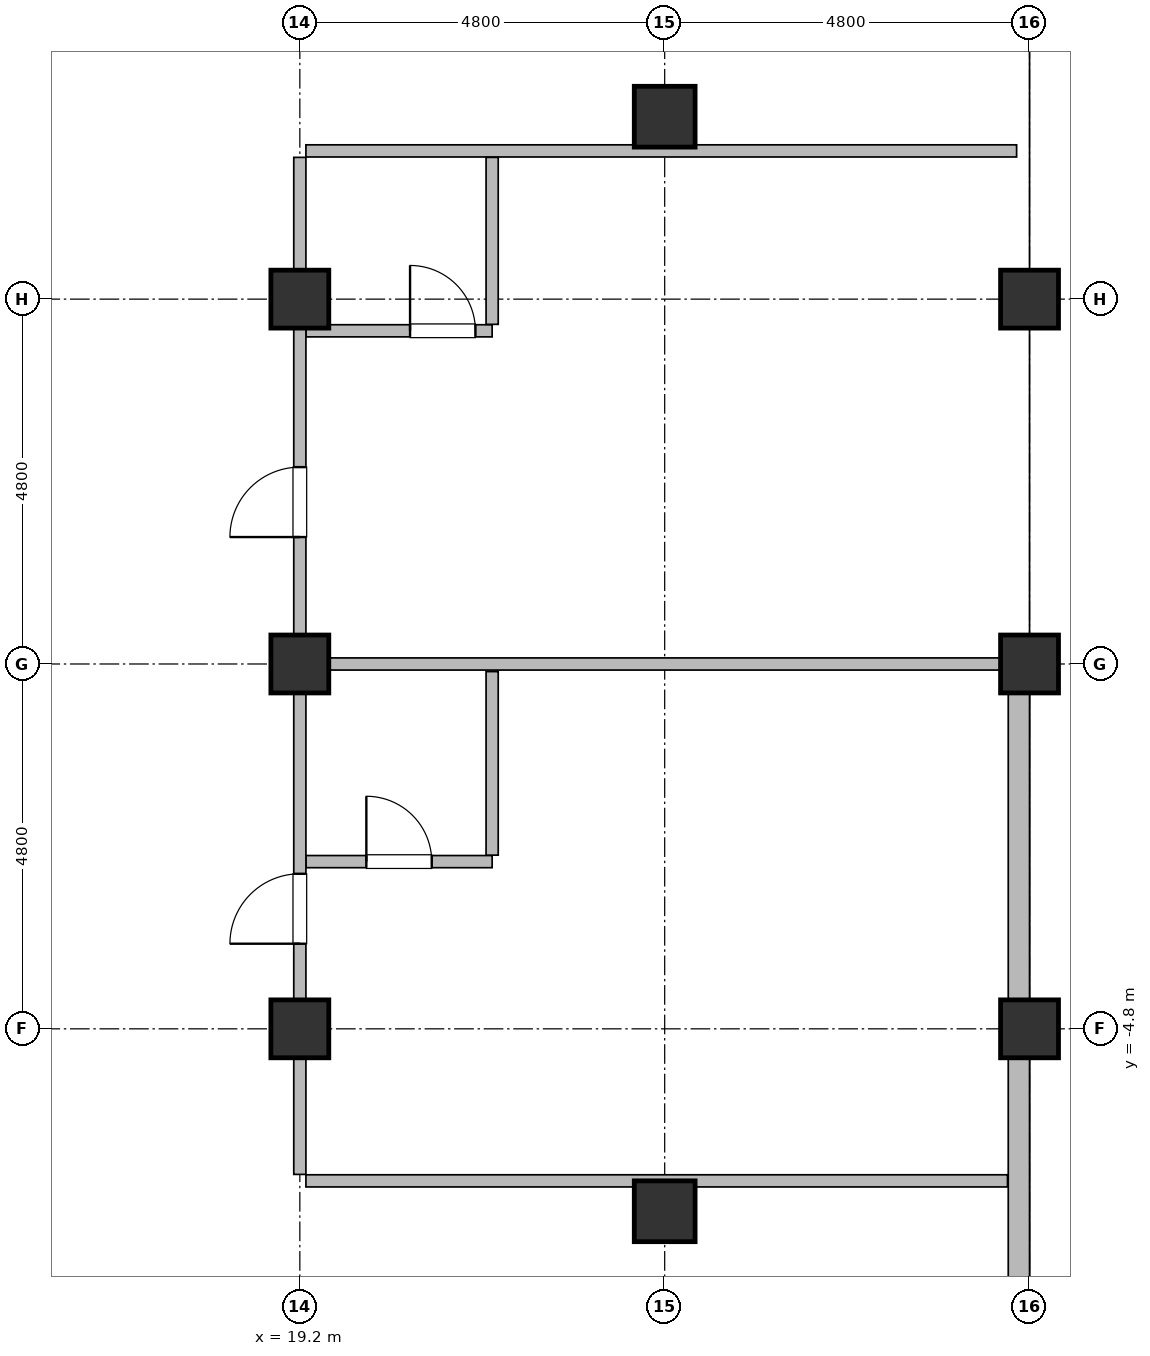
"""IFC4 building model, lengths in metres.
Left out: names, types, materials, properties, quantities, classifications, styles, units other than length and angle.
Written with IfcOpenShell. Run it as: python <this file> out.ifc"""

import sys

from ifc_helpers import new_model, si_unit, direction, frame, frame_2d, origin, origin_2d, place, context, subcontext, project, spatial, rectangle, hollow_rectangle, hollow_circle, extrude, element, fill, save


model = new_model("IFC4")
c1 = context("Model", 3, precision=1e-05, world=origin(), true_north=direction((0.0, 1.0)))
c2 = subcontext(c1, "Body", "Model", "MODEL_VIEW")
j1 = project(units=[si_unit("LENGTHUNIT", "METRE"), si_unit("PLANEANGLEUNIT", "RADIAN")], contexts=[c1])
p1 = place(None, origin())
s1 = spatial("IfcSite", under=j1, at=p1, CompositionType="ELEMENT")
p2 = place(p1, origin())
s2 = spatial("IfcBuilding", under=s1, at=p2, CompositionType="ELEMENT")
p3 = place(p2, frame((0.0, 0.0, 48.5)))
s3 = spatial("IfcBuildingStorey", under=s2, at=p3, CompositionType="ELEMENT", Elevation=48.5)
for number, where, z_axis, x_axis in (
    (1, (19.2, -4.8, 0.0), (0.0, 0.0, 1.0), (1.0, 0.0, 0.0)),
    (2, (19.2, 0.0, 0.0), (0.0, 0.0, 1.0), (1.0, 0.0, 0.0)),
    (3, (19.2, 4.8, 0.0), (0.0, 0.0, 1.0), (1.0, 0.0, 0.0)),
):
    element("IfcColumn", number, at=place(p3, frame(where, z_axis=z_axis, x_axis=x_axis)), inside=s3, PredefinedType="COLUMN", context=c2, shape_type="SweptSolid", body=[
        extrude(hollow_circle(Radius=0.381, WallThickness=0.032, at=origin_2d()), origin(), (0.0, 0.0, 1.0), 3.7),
    ])
for number, where, z_axis, x_axis in (
    (4, (24.0, -7.2, 0.0), (0.0, 0.0, 1.0), (1.0, 0.0, 0.0)),
    (5, (24.0, 7.2, 0.0), (0.0, 0.0, 1.0), (1.0, 0.0, 0.0)),
):
    element("IfcColumn", number, at=place(p3, frame(where, z_axis=z_axis, x_axis=x_axis)), inside=s3, PredefinedType="COLUMN", context=c2, shape_type="SweptSolid", body=[
        extrude(hollow_rectangle(XDim=0.8, YDim=0.8, WallThickness=0.036, at=origin_2d()), origin(), (0.0, 0.0, 1.0), 3.7),
    ])
for number, where, z_axis, x_axis in (
    (6, (28.8, -4.8, 0.0), (0.0, 0.0, 1.0), (1.0, 0.0, 0.0)),
    (7, (28.8, 0.0, 0.0), (0.0, 0.0, 1.0), (1.0, 0.0, 0.0)),
    (8, (28.8, 4.8, 0.0), (0.0, 0.0, 1.0), (1.0, 0.0, 0.0)),
):
    element("IfcColumn", number, at=place(p3, frame(where, z_axis=z_axis, x_axis=x_axis)), inside=s3, PredefinedType="COLUMN", context=c2, shape_type="SweptSolid", body=[
        extrude(hollow_circle(Radius=0.381, WallThickness=0.032, at=origin_2d()), origin(), (0.0, 0.0, 1.0), 3.7),
    ])
p4 = place(p3, frame((28.66, -20.4, 0.0), z_axis=(0.0, 0.0, 1.0), x_axis=(0.0, 1.0, 0.0)))
e9 = element("IfcWall", 9, at=p4, inside=s3, PredefinedType="SOLIDWALL", context=c2, shape_type="SweptSolid", body=[
    extrude(rectangle(XDim=20.38, YDim=0.28, at=frame_2d((10.19, 0.0))), origin(), (0.0, 0.0, 1.0), 2.12),
])
p5 = place(p4, frame((17.25, 0.0, 0.75)))
e10 = element("IfcOpeningElement", 10, at=p5, cuts=e9, PredefinedType="OPENING", context=c2, shape_type="SweptSolid", body=[
    extrude(rectangle(XDim=1.5, YDim=1.15, at=frame_2d((0.75, 0.575))), frame((0.0, 0.155, 0.0), z_axis=(0.0, -1.0, 0.0), x_axis=(1.0, 0.0, 0.0)), (0.0, 0.0, 1.0), 0.31),
])
p6 = place(p3, frame((19.28, -6.8, 0.0), z_axis=(0.0, 0.0, 1.0), x_axis=(1.0, 0.0, 0.0)))
e11 = element("IfcWall", 11, at=p6, inside=s3, PredefinedType="PARTITIONING", context=c2, shape_type="SweptSolid", body=[
    extrude(rectangle(XDim=9.23, YDim=0.16, at=frame_2d((4.615, 0.0))), origin(), (0.0, 0.0, 1.0), 2.62),
])
p7 = place(p3, frame((19.28, -2.6, 0.0), z_axis=(0.0, 0.0, 1.0), x_axis=(1.0, 0.0, 0.0)))
e12 = element("IfcWall", 12, at=p7, inside=s3, PredefinedType="PARTITIONING", context=c2, shape_type="SweptSolid", body=[
    extrude(rectangle(XDim=2.45, YDim=0.16, at=frame_2d((1.225, 0.0))), origin(), (0.0, 0.0, 1.0), 2.82),
])
p8 = place(p7, frame((0.795, 0.0, 0.0)))
e13 = element("IfcOpeningElement", 13, at=p8, cuts=e12, PredefinedType="OPENING", context=c2, shape_type="SweptSolid", body=[
    extrude(rectangle(XDim=0.86, YDim=2.1, at=frame_2d((0.43, 1.05))), frame((0.0, 0.095, 0.0), z_axis=(0.0, -1.0, 0.0), x_axis=(1.0, 0.0, 0.0)), (0.0, 0.0, 1.0), 0.19),
])
p9 = place(p3, frame((19.28, 0.0, 0.0), z_axis=(0.0, 0.0, 1.0), x_axis=(1.0, 0.0, 0.0)))
e14 = element("IfcWall", 14, at=p9, inside=s3, PredefinedType="PARTITIONING", context=c2, shape_type="SweptSolid", body=[
    extrude(rectangle(XDim=9.35, YDim=0.16, at=frame_2d((4.675, 0.0))), origin(), (0.0, 0.0, 1.0), 2.82),
])
p10 = place(p3, frame((19.28, 4.383, 0.0), z_axis=(0.0, 0.0, 1.0), x_axis=(1.0, 0.0, 0.0)))
e15 = element("IfcWall", 15, at=p10, inside=s3, PredefinedType="PARTITIONING", context=c2, shape_type="SweptSolid", body=[
    extrude(rectangle(XDim=2.45, YDim=0.16, at=frame_2d((1.225, 0.0))), origin(), (0.0, 0.0, 1.0), 2.82),
])
p11 = place(p10, frame((1.37, 0.0, 0.0)))
e16 = element("IfcOpeningElement", 16, at=p11, cuts=e15, PredefinedType="OPENING", context=c2, shape_type="SweptSolid", body=[
    extrude(rectangle(XDim=0.86, YDim=2.1, at=frame_2d((0.43, 1.05))), frame((0.0, 0.095, 0.0), z_axis=(0.0, -1.0, 0.0), x_axis=(1.0, 0.0, 0.0)), (0.0, 0.0, 1.0), 0.19),
])
p12 = place(p3, frame((19.28, 6.75, 0.0), z_axis=(0.0, 0.0, 1.0), x_axis=(1.0, 0.0, 0.0)))
e17 = element("IfcWall", 17, at=p12, inside=s3, PredefinedType="PARTITIONING", context=c2, shape_type="SweptSolid", body=[
    extrude(rectangle(XDim=9.35, YDim=0.16, at=frame_2d((4.675, 0.0))), origin(), (0.0, 0.0, 1.0), 2.62),
])
p13 = place(p3, frame((19.2, -6.715, 0.0), z_axis=(0.0, 0.0, 1.0), x_axis=(0.0, 1.0, 0.0)))
e18 = element("IfcWall", 18, at=p13, inside=s3, PredefinedType="PARTITIONING", context=c2, shape_type="SweptSolid", body=[
    extrude(rectangle(XDim=13.38, YDim=0.16, at=frame_2d((6.69, 0.0))), origin(), (0.0, 0.0, 1.0), 2.62),
])
p14 = place(p13, frame((3.035, 0.0, 0.0)))
e19 = element("IfcOpeningElement", 19, at=p14, cuts=e18, PredefinedType="OPENING", context=c2, shape_type="SweptSolid", body=[
    extrude(rectangle(XDim=0.92, YDim=2.15, at=frame_2d((0.46, 1.075))), frame((0.0, 0.095, 0.0), z_axis=(0.0, -1.0, 0.0), x_axis=(1.0, 0.0, 0.0)), (0.0, 0.0, 1.0), 0.19),
])
p15 = place(p13, frame((8.385, 0.0, 0.0)))
e20 = element("IfcOpeningElement", 20, at=p15, cuts=e18, PredefinedType="OPENING", context=c2, shape_type="SweptSolid", body=[
    extrude(rectangle(XDim=0.92, YDim=2.15, at=frame_2d((0.46, 1.075))), frame((0.0, 0.095, 0.0), z_axis=(0.0, -1.0, 0.0), x_axis=(1.0, 0.0, 0.0)), (0.0, 0.0, 1.0), 0.19),
])
p16 = place(p3, frame((21.73, -2.515, 0.0), z_axis=(0.0, 0.0, 1.0), x_axis=(0.0, 1.0, 0.0)))
e21 = element("IfcWall", 21, at=p16, inside=s3, PredefinedType="PARTITIONING", context=c2, shape_type="SweptSolid", body=[
    extrude(rectangle(XDim=2.415, YDim=0.16, at=frame_2d((1.208, 0.0))), origin(), (0.0, 0.0, 1.0), 3.52),
])
p17 = place(p3, frame((21.73, 4.468, 0.0), z_axis=(0.0, 0.0, 1.0), x_axis=(0.0, 1.0, 0.0)))
e22 = element("IfcWall", 22, at=p17, inside=s3, PredefinedType="PARTITIONING", context=c2, shape_type="SweptSolid", body=[
    extrude(rectangle(XDim=2.197, YDim=0.16, at=frame_2d((1.098, 0.0))), origin(), (0.0, 0.0, 1.0), 3.52),
])
p18 = place(p5, origin())
e23 = element("IfcWindow", 23, at=p18, inside=s3, PartitioningType="SINGLE_PANEL", PredefinedType="WINDOW", context=c2, shape_type="SweptSolid", body=[
    extrude(rectangle(XDim=1.5, YDim=1.15, at=frame_2d((0.75, 0.575))), frame((0.0, 0.03, 0.0), z_axis=(0.0, -1.0, 0.0), x_axis=(1.0, 0.0, 0.0)), (0.0, 0.0, 1.0), 0.06),
])
fill(e10, e23)
p19 = place(p14, origin())
e24 = element("IfcDoor", 24, at=p19, inside=s3, OperationType="SINGLE_SWING_LEFT", PredefinedType="DOOR", context=c2, shape_type="SweptSolid", body=[
    extrude(rectangle(XDim=0.92, YDim=2.15, at=frame_2d((0.46, 1.075))), frame((0.0, 0.025, 0.0), z_axis=(0.0, -1.0, 0.0), x_axis=(1.0, 0.0, 0.0)), (0.0, 0.0, 1.0), 0.05),
])
fill(e19, e24)
p20 = place(p8, origin())
e25 = element("IfcDoor", 25, at=p20, inside=s3, OperationType="SINGLE_SWING_RIGHT", PredefinedType="DOOR", context=c2, shape_type="SweptSolid", body=[
    extrude(rectangle(XDim=0.86, YDim=2.1, at=frame_2d((0.43, 1.05))), frame((0.0, 0.025, 0.0), z_axis=(0.0, -1.0, 0.0), x_axis=(1.0, 0.0, 0.0)), (0.0, 0.0, 1.0), 0.05),
])
fill(e13, e25)
p21 = place(p15, origin())
e26 = element("IfcDoor", 26, at=p21, inside=s3, OperationType="SINGLE_SWING_LEFT", PredefinedType="DOOR", context=c2, shape_type="SweptSolid", body=[
    extrude(rectangle(XDim=0.92, YDim=2.15, at=frame_2d((0.46, 1.075))), frame((0.0, 0.025, 0.0), z_axis=(0.0, -1.0, 0.0), x_axis=(1.0, 0.0, 0.0)), (0.0, 0.0, 1.0), 0.05),
])
fill(e20, e26)
p22 = place(p11, origin())
e27 = element("IfcDoor", 27, at=p22, inside=s3, OperationType="SINGLE_SWING_LEFT", PredefinedType="DOOR", context=c2, shape_type="SweptSolid", body=[
    extrude(rectangle(XDim=0.86, YDim=2.1, at=frame_2d((0.43, 1.05))), frame((0.0, 0.025, 0.0), z_axis=(0.0, -1.0, 0.0), x_axis=(1.0, 0.0, 0.0)), (0.0, 0.0, 1.0), 0.05),
])
fill(e16, e27)
save(model, sys.argv[1])
